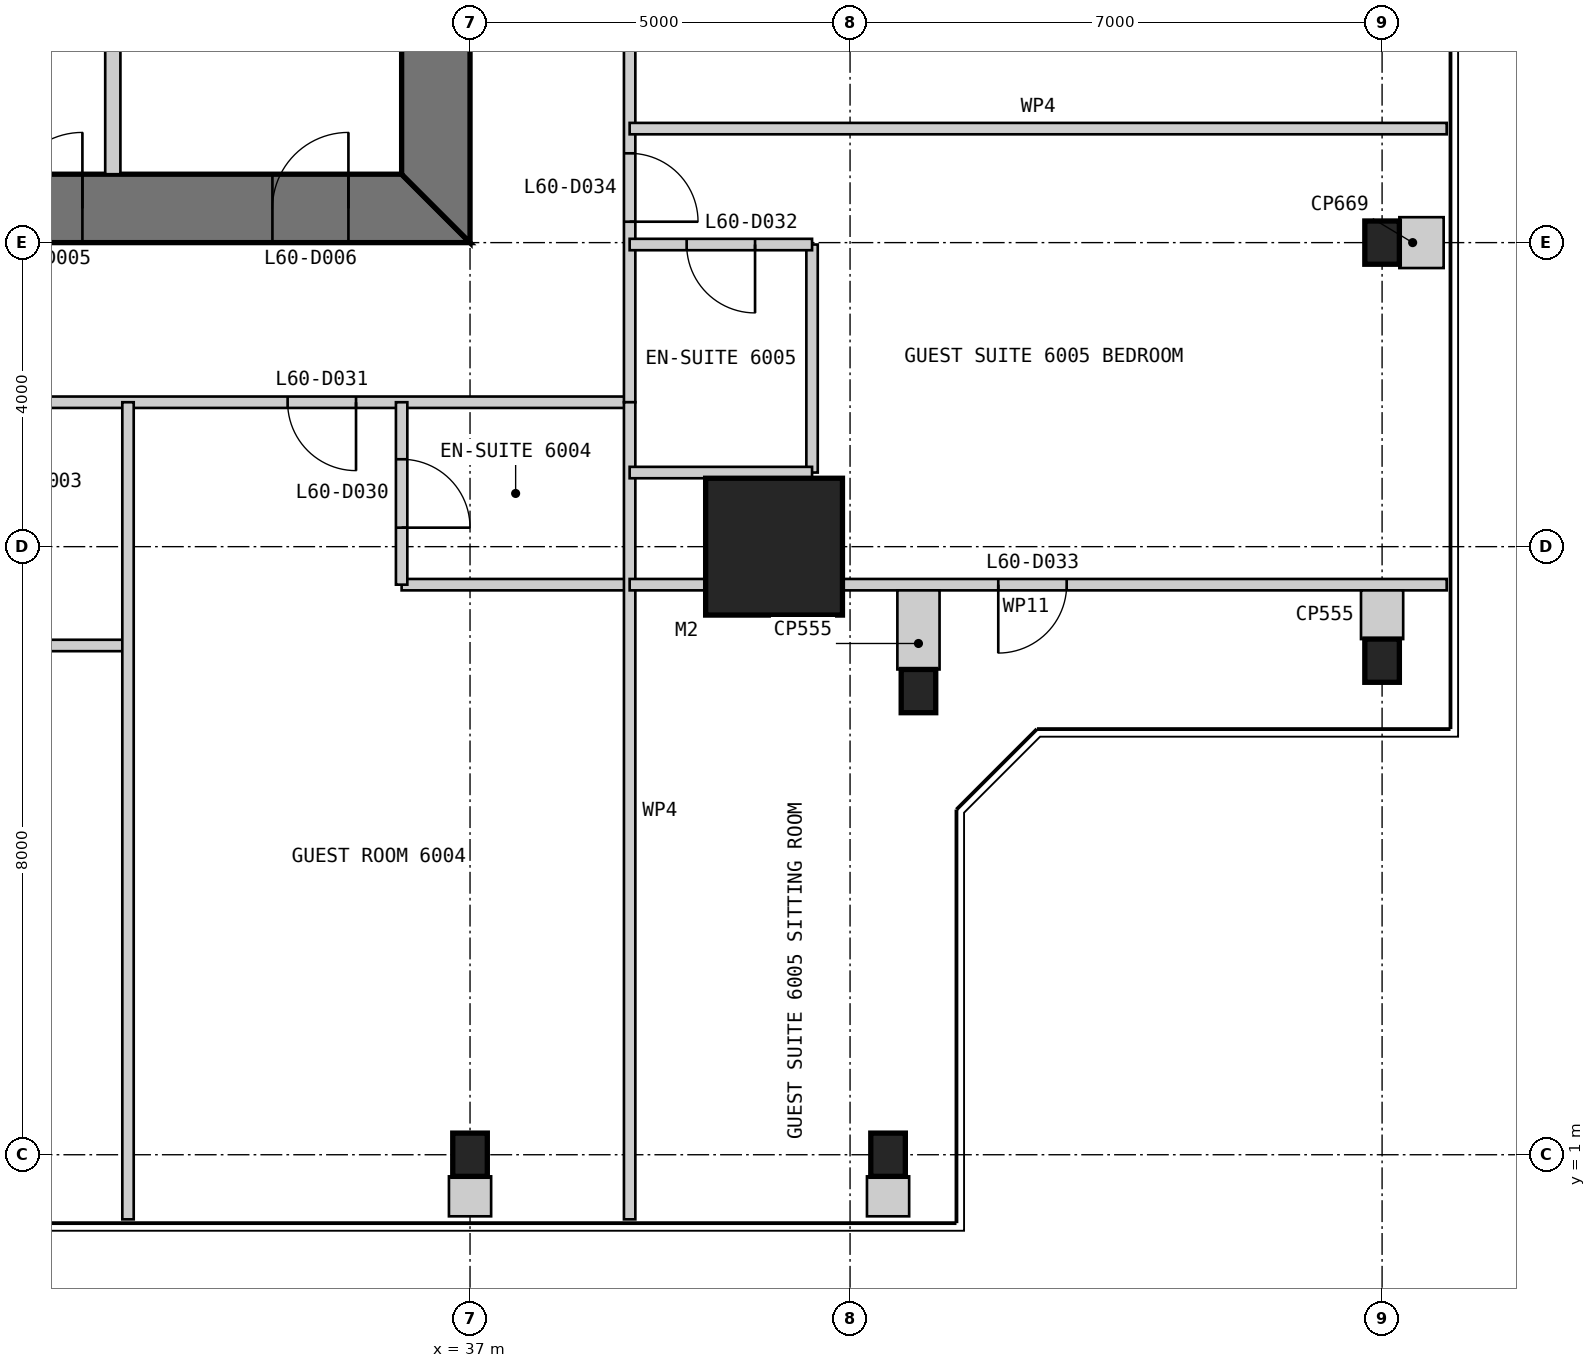
"""IFC4 building model, lengths in metres.
Left out: names, types, materials, properties, quantities, classifications, styles, units other than length and angle.
Written with IfcOpenShell. Run it as: python <this file> out.ifc"""

import sys

from ifc_helpers import new_model, si_unit, direction, frame, frame_2d, origin, origin_2d, place, context, subcontext, project, spatial, polyline, rectangle, i_section, outline, extrude, element, fill, save


model = new_model("IFC4")
c1 = context("Model", 3, precision=1e-05, world=origin(), true_north=direction((0.0, 1.0)))
c2 = subcontext(c1, "Body", "Model", "MODEL_VIEW")
j1 = project(units=[si_unit("LENGTHUNIT", "METRE"), si_unit("PLANEANGLEUNIT", "RADIAN")], contexts=[c1])
p1 = place(None, origin())
s1 = spatial("IfcSite", under=j1, at=p1, CompositionType="ELEMENT")
p2 = place(p1, origin())
s2 = spatial("IfcBuilding", under=s1, at=p2, CompositionType="ELEMENT")
p3 = place(p2, frame((0.0, 0.0, 256.0)))
s3 = spatial("IfcBuildingStorey", under=s2, at=p3, CompositionType="ELEMENT", Elevation=256.0)
p4 = place(p3, frame((41.0, 9.0, 0.0), z_axis=(0.0, 0.0, 1.0), x_axis=(1.0, 0.0, 0.0)))
e1 = element("IfcColumn", 1, at=p4, inside=s3, PredefinedType="COLUMN", context=c2, shape_type="SweptSolid", body=[
    extrude(rectangle(XDim=1.8, YDim=1.8, at=origin_2d()), origin(), (0.0, 0.0, 1.0), 3.4),
])
for number, where, z_axis, x_axis in (
    (2, (37.0, 1.0, 0.0), (0.0, 0.0, 1.0), (1.0, 0.0, 0.0)),
    (3, (42.5, 1.0, 0.0), (0.0, 0.0, 1.0), (1.0, 0.0, 0.0)),
    (4, (42.9, 7.1, 0.0), (0.0, 0.0, 1.0), (1.0, 0.0, 0.0)),
    (5, (49.0, 7.5, 0.0), (0.0, 0.0, 1.0), (1.0, 0.0, 0.0)),
    (6, (49.0, 13.0, 0.0), (0.0, 0.0, 1.0), (1.0, 0.0, 0.0)),
):
    element("IfcColumn", number, at=place(p3, frame(where, z_axis=z_axis, x_axis=x_axis)), inside=s3, PredefinedType="COLUMN", context=c2, shape_type="SweptSolid", body=[
        extrude(i_section(OverallWidth=0.455, OverallDepth=0.569, WebThickness=0.078, FlangeThickness=0.125, at=origin_2d()), origin(), (0.0, 0.0, 1.0), 3.4),
    ])
p5 = place(p3, frame((13.0, 13.45, 0.0), z_axis=(0.0, 0.0, 1.0), x_axis=(1.0, 0.0, 0.0)))
e7 = element("IfcWall", 7, at=p5, inside=s3, PredefinedType="SHEAR", context=c2, shape_type="SweptSolid", body=[
    extrude(outline(polyline([(0.0, -0.45), (24.0, -0.45), (23.1, 0.45), (0.9, 0.45), (0.0, -0.45)])), origin(), (0.0, 0.0, 1.0), 3.4),
])
p6 = place(p5, frame((4.9, 0.0, 0.0)))
e8 = element("IfcOpeningElement", 8, at=p6, cuts=e7, PredefinedType="OPENING", context=c2, shape_type="SweptSolid", body=[
    extrude(rectangle(XDim=1.0, YDim=2.2, at=frame_2d((0.5, 1.1))), frame((0.0, 0.46, 0.0), z_axis=(0.0, -1.0, 0.0), x_axis=(1.0, 0.0, 0.0)), (0.0, 0.0, 1.0), 0.92),
])
p7 = place(p5, frame((8.9, 0.0, 0.0)))
e9 = element("IfcOpeningElement", 9, at=p7, cuts=e7, PredefinedType="OPENING", context=c2, shape_type="SweptSolid", body=[
    extrude(rectangle(XDim=1.1, YDim=2.2, at=frame_2d((0.55, 1.1))), frame((0.0, 0.46, 0.0), z_axis=(0.0, -1.0, 0.0), x_axis=(1.0, 0.0, 0.0)), (0.0, 0.0, 1.0), 0.92),
])
p8 = place(p5, frame((15.05, 0.0, 0.0)))
e10 = element("IfcOpeningElement", 10, at=p8, cuts=e7, PredefinedType="OPENING", context=c2, shape_type="SweptSolid", body=[
    extrude(rectangle(XDim=0.9, YDim=2.2, at=frame_2d((0.45, 1.1))), frame((0.0, 0.46, 0.0), z_axis=(0.0, -1.0, 0.0), x_axis=(1.0, 0.0, 0.0)), (0.0, 0.0, 1.0), 0.92),
])
p9 = place(p5, frame((17.9, 0.0, 0.0)))
e11 = element("IfcOpeningElement", 11, at=p9, cuts=e7, PredefinedType="OPENING", context=c2, shape_type="SweptSolid", body=[
    extrude(rectangle(XDim=1.0, YDim=2.2, at=frame_2d((0.5, 1.1))), frame((0.0, 0.46, 0.0), z_axis=(0.0, -1.0, 0.0), x_axis=(1.0, 0.0, 0.0)), (0.0, 0.0, 1.0), 0.92),
])
p10 = place(p5, frame((21.4, 0.0, 0.0)))
e12 = element("IfcOpeningElement", 12, at=p10, cuts=e7, PredefinedType="OPENING", context=c2, shape_type="SweptSolid", body=[
    extrude(rectangle(XDim=1.0, YDim=2.2, at=frame_2d((0.5, 1.1))), frame((0.0, 0.46, 0.0), z_axis=(0.0, -1.0, 0.0), x_axis=(1.0, 0.0, 0.0)), (0.0, 0.0, 1.0), 0.92),
])
p11 = place(p3, frame((36.55, 13.9, 0.0), z_axis=(0.0, 0.0, 1.0), x_axis=(0.0, 1.0, 0.0)))
e13 = element("IfcWall", 13, at=p11, inside=s3, PredefinedType="SHEAR", context=c2, shape_type="SweptSolid", body=[
    extrude(outline(polyline([(-0.9, -0.45), (23.1, -0.45), (22.2, 0.45), (0.0, 0.45), (-0.9, -0.45)])), origin(), (0.0, 0.0, 1.0), 3.4),
])
p12 = place(p11, frame((20.2, 0.0, 0.0)))
e14 = element("IfcOpeningElement", 14, at=p12, cuts=e13, PredefinedType="OPENING", context=c2, shape_type="SweptSolid", body=[
    extrude(rectangle(XDim=1.0, YDim=2.2, at=frame_2d((0.5, 1.1))), frame((0.0, 0.46, 0.0), z_axis=(0.0, -1.0, 0.0), x_axis=(1.0, 0.0, 0.0)), (0.0, 0.0, 1.0), 0.92),
])
p13 = place(p11, frame((17.25, 0.0, 0.0)))
e15 = element("IfcOpeningElement", 15, at=p13, cuts=e13, PredefinedType="OPENING", context=c2, shape_type="SweptSolid", body=[
    extrude(rectangle(XDim=0.9, YDim=2.2, at=frame_2d((0.45, 1.1))), frame((0.0, 0.46, 0.0), z_axis=(0.0, -1.0, 0.0), x_axis=(1.0, 0.0, 0.0)), (0.0, 0.0, 1.0), 0.92),
])
p14 = place(p3, frame((32.3, 13.9, 0.0), z_axis=(0.0, 0.0, 1.0), x_axis=(0.0, 1.0, 0.0)))
e16 = element("IfcWall", 16, at=p14, inside=s3, PredefinedType="PARTITIONING", context=c2, shape_type="SweptSolid", body=[
    extrude(rectangle(XDim=6.1, YDim=0.2, at=frame_2d((3.05, 0.0))), origin(), (0.0, 0.0, 1.0), 3.2),
])
p15 = place(p3, frame((10.9, 10.9, 0.0), z_axis=(0.0, 0.0, 1.0), x_axis=(1.0, 0.0, 0.0)))
e17 = element("IfcWall", 17, at=p15, inside=s3, PredefinedType="PARTITIONING", context=c2, shape_type="SweptSolid", body=[
    extrude(rectangle(XDim=28.2, YDim=0.15, at=frame_2d((14.1, 0.0))), origin(), (0.0, 0.0, 1.0), 3.25),
])
p16 = place(p15, frame((2.375, 0.0, 0.0)))
e18 = element("IfcOpeningElement", 18, at=p16, cuts=e17, PredefinedType="OPENING", context=c2, shape_type="SweptSolid", body=[
    extrude(rectangle(XDim=0.9, YDim=2.1, at=frame_2d((0.45, 1.05))), frame((0.0, 0.085, 0.0), z_axis=(0.0, -1.0, 0.0), x_axis=(1.0, 0.0, 0.0)), (0.0, 0.0, 1.0), 0.17),
])
p17 = place(p15, frame((10.7, 0.0, 0.0)))
e19 = element("IfcOpeningElement", 19, at=p17, cuts=e17, PredefinedType="OPENING", context=c2, shape_type="SweptSolid", body=[
    extrude(rectangle(XDim=0.9, YDim=2.1, at=frame_2d((0.45, 1.05))), frame((0.0, 0.085, 0.0), z_axis=(0.0, -1.0, 0.0), x_axis=(1.0, 0.0, 0.0)), (0.0, 0.0, 1.0), 0.17),
])
p18 = place(p15, frame((16.8, 0.0, 0.0)))
e20 = element("IfcOpeningElement", 20, at=p18, cuts=e17, PredefinedType="OPENING", context=c2, shape_type="SweptSolid", body=[
    extrude(rectangle(XDim=1.0, YDim=2.1, at=frame_2d((0.5, 1.05))), frame((0.0, 0.085, 0.0), z_axis=(0.0, -1.0, 0.0), x_axis=(1.0, 0.0, 0.0)), (0.0, 0.0, 1.0), 0.17),
])
p19 = place(p15, frame((23.7, 0.0, 0.0)))
e21 = element("IfcOpeningElement", 21, at=p19, cuts=e17, PredefinedType="OPENING", context=c2, shape_type="SweptSolid", body=[
    extrude(rectangle(XDim=0.9, YDim=2.1, at=frame_2d((0.45, 1.05))), frame((0.0, 0.085, 0.0), z_axis=(0.0, -1.0, 0.0), x_axis=(1.0, 0.0, 0.0)), (0.0, 0.0, 1.0), 0.17),
])
p20 = place(p3, frame((29.3, 7.7, 0.0), z_axis=(0.0, 0.0, 1.0), x_axis=(1.0, 0.0, 0.0)))
e22 = element("IfcWall", 22, at=p20, inside=s3, PredefinedType="PARTITIONING", context=c2, shape_type="SweptSolid", body=[
    extrude(rectangle(XDim=3.2, YDim=0.15, at=frame_2d((1.6, 0.0))), origin(), (0.0, 0.0, 1.0), 3.25),
])
p21 = place(p3, frame((32.5, 0.15, 0.0), z_axis=(0.0, 0.0, 1.0), x_axis=(0.0, 1.0, 0.0)))
e23 = element("IfcWall", 23, at=p21, inside=s3, PredefinedType="PARTITIONING", context=c2, shape_type="SweptSolid", body=[
    extrude(rectangle(XDim=10.75, YDim=0.15, at=frame_2d((5.375, 0.0))), origin(), (0.0, 0.0, 1.0), 3.25),
])
p22 = place(p3, frame((36.1, 8.5, 0.0), z_axis=(0.0, 0.0, 1.0), x_axis=(1.0, 0.0, 0.0)))
e24 = element("IfcWall", 24, at=p22, inside=s3, PredefinedType="PARTITIONING", context=c2, shape_type="SweptSolid", body=[
    extrude(rectangle(XDim=3.0, YDim=0.15, at=frame_2d((1.5, 0.0))), origin(), (0.0, 0.0, 1.0), 3.25),
])
p23 = place(p3, frame((36.1, 8.5, 0.0), z_axis=(0.0, 0.0, 1.0), x_axis=(0.0, 1.0, 0.0)))
e25 = element("IfcWall", 25, at=p23, inside=s3, PredefinedType="PARTITIONING", context=c2, shape_type="SweptSolid", body=[
    extrude(rectangle(XDim=2.4, YDim=0.15, at=frame_2d((1.2, 0.0))), origin(), (0.0, 0.0, 1.0), 3.25),
])
p24 = place(p23, frame((0.75, 0.0, 0.0)))
e26 = element("IfcOpeningElement", 26, at=p24, cuts=e25, PredefinedType="OPENING", context=c2, shape_type="SweptSolid", body=[
    extrude(rectangle(XDim=0.9, YDim=2.1, at=frame_2d((0.45, 1.05))), frame((0.0, 0.085, 0.0), z_axis=(0.0, -1.0, 0.0), x_axis=(1.0, 0.0, 0.0)), (0.0, 0.0, 1.0), 0.17),
])
p25 = place(p3, frame((39.1, 10.9, 0.0), z_axis=(0.0, 0.0, 1.0), x_axis=(0.0, 1.0, 0.0)))
e27 = element("IfcWall", 27, at=p25, inside=s3, PredefinedType="PARTITIONING", context=c2, shape_type="SweptSolid", body=[
    extrude(rectangle(XDim=28.2, YDim=0.15, at=frame_2d((14.1, 0.0))), origin(), (0.0, 0.0, 1.0), 3.25),
])
p26 = place(p25, frame((2.375, 0.0, 0.0)))
e28 = element("IfcOpeningElement", 28, at=p26, cuts=e27, PredefinedType="OPENING", context=c2, shape_type="SweptSolid", body=[
    extrude(rectangle(XDim=0.9, YDim=2.1, at=frame_2d((0.45, 1.05))), frame((0.0, 0.085, 0.0), z_axis=(0.0, -1.0, 0.0), x_axis=(1.0, 0.0, 0.0)), (0.0, 0.0, 1.0), 0.17),
])
p27 = place(p25, frame((10.7, 0.0, 0.0)))
e29 = element("IfcOpeningElement", 29, at=p27, cuts=e27, PredefinedType="OPENING", context=c2, shape_type="SweptSolid", body=[
    extrude(rectangle(XDim=0.9, YDim=2.1, at=frame_2d((0.45, 1.05))), frame((0.0, 0.085, 0.0), z_axis=(0.0, -1.0, 0.0), x_axis=(1.0, 0.0, 0.0)), (0.0, 0.0, 1.0), 0.17),
])
p28 = place(p25, frame((17.1, 0.0, 0.0)))
e30 = element("IfcOpeningElement", 30, at=p28, cuts=e27, PredefinedType="OPENING", context=c2, shape_type="SweptSolid", body=[
    extrude(rectangle(XDim=0.9, YDim=2.1, at=frame_2d((0.45, 1.05))), frame((0.0, 0.085, 0.0), z_axis=(0.0, -1.0, 0.0), x_axis=(1.0, 0.0, 0.0)), (0.0, 0.0, 1.0), 0.17),
])
p29 = place(p25, frame((23.7, 0.0, 0.0)))
e31 = element("IfcOpeningElement", 31, at=p29, cuts=e27, PredefinedType="OPENING", context=c2, shape_type="SweptSolid", body=[
    extrude(rectangle(XDim=0.9, YDim=2.1, at=frame_2d((0.45, 1.05))), frame((0.0, 0.085, 0.0), z_axis=(0.0, -1.0, 0.0), x_axis=(1.0, 0.0, 0.0)), (0.0, 0.0, 1.0), 0.17),
])
p30 = place(p3, frame((39.1, 0.15, 0.0), z_axis=(0.0, 0.0, 1.0), x_axis=(0.0, 1.0, 0.0)))
e32 = element("IfcWall", 32, at=p30, inside=s3, PredefinedType="PARTITIONING", context=c2, shape_type="SweptSolid", body=[
    extrude(rectangle(XDim=10.75, YDim=0.15, at=frame_2d((5.375, 0.0))), origin(), (0.0, 0.0, 1.0), 3.25),
])
p31 = place(p3, frame((41.5, 9.975, 0.0), z_axis=(0.0, 0.0, 1.0), x_axis=(0.0, 1.0, 0.0)))
e33 = element("IfcWall", 33, at=p31, inside=s3, PredefinedType="PARTITIONING", context=c2, shape_type="SweptSolid", body=[
    extrude(rectangle(XDim=3.0, YDim=0.15, at=frame_2d((1.5, 0.0))), origin(), (0.0, 0.0, 1.0), 3.25),
])
p32 = place(p3, frame((41.5, 12.975, 0.0), z_axis=(0.0, 0.0, 1.0), x_axis=(-1.0, 0.0, 0.0)))
e34 = element("IfcWall", 34, at=p32, inside=s3, PredefinedType="PARTITIONING", context=c2, shape_type="SweptSolid", body=[
    extrude(rectangle(XDim=2.4, YDim=0.15, at=frame_2d((1.2, 0.0))), origin(), (0.0, 0.0, 1.0), 2.404),
])
p33 = place(p32, frame((0.75, 0.0, 0.0)))
e35 = element("IfcOpeningElement", 35, at=p33, cuts=e34, PredefinedType="OPENING", context=c2, shape_type="SweptSolid", body=[
    extrude(rectangle(XDim=0.9, YDim=2.1, at=frame_2d((0.45, 1.05))), frame((0.0, 0.085, 0.0), z_axis=(0.0, -1.0, 0.0), x_axis=(1.0, 0.0, 0.0)), (0.0, 0.0, 1.0), 0.17),
])
p34 = place(p3, frame((41.5, 9.975, 0.0), z_axis=(0.0, 0.0, 1.0), x_axis=(-1.0, 0.0, 0.0)))
e36 = element("IfcWall", 36, at=p34, inside=s3, PredefinedType="PARTITIONING", context=c2, shape_type="SweptSolid", body=[
    extrude(rectangle(XDim=2.4, YDim=0.15, at=frame_2d((1.2, 0.0))), origin(), (0.0, 0.0, 1.0), 3.25),
])
p35 = place(p3, frame((49.85, 8.5, 0.0), z_axis=(0.0, 0.0, 1.0), x_axis=(-1.0, 0.0, 0.0)))
e37 = element("IfcWall", 37, at=p35, inside=s3, PredefinedType="PARTITIONING", context=c2, shape_type="SweptSolid", body=[
    extrude(rectangle(XDim=10.75, YDim=0.15, at=frame_2d((5.375, 0.0))), origin(), (0.0, 0.0, 1.0), 3.25),
])
p36 = place(p35, frame((5.0, 0.0, 0.0)))
e38 = element("IfcOpeningElement", 38, at=p36, cuts=e37, PredefinedType="OPENING", context=c2, shape_type="SweptSolid", body=[
    extrude(rectangle(XDim=0.9, YDim=2.1, at=frame_2d((0.45, 1.05))), frame((0.0, 0.085, 0.0), z_axis=(0.0, -1.0, 0.0), x_axis=(1.0, 0.0, 0.0)), (0.0, 0.0, 1.0), 0.17),
])
p37 = place(p3, frame((49.85, 14.5, 0.0), z_axis=(0.0, 0.0, 1.0), x_axis=(-1.0, 0.0, 0.0)))
e39 = element("IfcWall", 39, at=p37, inside=s3, PredefinedType="PARTITIONING", context=c2, shape_type="SweptSolid", body=[
    extrude(rectangle(XDim=10.75, YDim=0.15, at=frame_2d((5.375, 0.0))), origin(), (0.0, 0.0, 1.0), 3.25),
])
for number, where, z_axis, x_axis in (
    (40, (37.0, 0.19, 0.0), (0.0, 0.0, 1.0), (0.0, 1.0, 0.0)),
    (41, (42.5, 0.19, 0.0), (0.0, 0.0, 1.0), (0.0, 1.0, 0.0)),
):
    element("IfcWall", number, at=place(p3, frame(where, z_axis=z_axis, x_axis=x_axis)), inside=s3, PredefinedType="PARTITIONING", context=c2, shape_type="SweptSolid", body=[
        extrude(rectangle(XDim=0.526, YDim=0.555, at=frame_2d((0.263, 0.0))), origin(), (0.0, 0.0, 1.0), 3.25),
    ])
p38 = place(p3, frame((42.9, 8.425, 0.0), z_axis=(0.0, 0.0, 1.0), x_axis=(0.0, -1.0, 0.0)))
e42 = element("IfcWall", 42, at=p38, inside=s3, PredefinedType="PARTITIONING", context=c2, shape_type="SweptSolid", body=[
    extrude(rectangle(XDim=1.041, YDim=0.555, at=frame_2d((0.52, 0.0))), origin(), (0.0, 0.0, 1.0), 3.25),
])
p39 = place(p3, frame((49.0, 8.425, 0.0), z_axis=(0.0, 0.0, 1.0), x_axis=(0.0, -1.0, 0.0)))
e43 = element("IfcWall", 43, at=p39, inside=s3, PredefinedType="PARTITIONING", context=c2, shape_type="SweptSolid", body=[
    extrude(rectangle(XDim=0.641, YDim=0.555, at=frame_2d((0.32, 0.0))), origin(), (0.0, 0.0, 1.0), 2.338),
])
p40 = place(p3, frame((49.81, 13.0, 0.0), z_axis=(0.0, 0.0, 1.0), x_axis=(-1.0, 0.0, 0.0)))
e44 = element("IfcWall", 44, at=p40, inside=s3, PredefinedType="PARTITIONING", context=c2, shape_type="SweptSolid", body=[
    extrude(rectangle(XDim=0.583, YDim=0.669, at=frame_2d((0.292, 0.0))), origin(), (0.0, 0.0, 1.0), 3.25),
])
p41 = place(p9, origin())
e45 = element("IfcDoor", 45, at=p41, inside=s3, OperationType="SINGLE_SWING_RIGHT", PredefinedType="DOOR", context=c2, shape_type="SweptSolid", body=[
    extrude(rectangle(XDim=1.0, YDim=2.2, at=frame_2d((0.5, 1.1))), frame((0.0, 0.025, 0.0), z_axis=(0.0, -1.0, 0.0), x_axis=(1.0, 0.0, 0.0)), (0.0, 0.0, 1.0), 0.05),
    extrude(outline(polyline([(0.0, 0.0), (0.04, 0.0), (0.04, 2.16), (0.96, 2.16), (0.96, 0.0), (1.0, 0.0), (1.0, 2.2), (0.0, 2.2), (0.0, 0.0)])), frame((0.0, 0.3, 0.0), z_axis=(0.0, -1.0, 0.0), x_axis=(1.0, 0.0, 0.0)), (0.0, 0.0, 1.0), 0.6),
])
fill(e11, e45)
p42 = place(p10, origin())
e46 = element("IfcDoor", 46, at=p42, inside=s3, OperationType="SINGLE_SWING_RIGHT", PredefinedType="DOOR", context=c2, shape_type="SweptSolid", body=[
    extrude(rectangle(XDim=1.0, YDim=2.2, at=frame_2d((0.5, 1.1))), frame((0.0, 0.025, 0.0), z_axis=(0.0, -1.0, 0.0), x_axis=(1.0, 0.0, 0.0)), (0.0, 0.0, 1.0), 0.05),
    extrude(outline(polyline([(0.0, 0.0), (0.04, 0.0), (0.04, 2.16), (0.96, 2.16), (0.96, 0.0), (1.0, 0.0), (1.0, 2.2), (0.0, 2.2), (0.0, 0.0)])), frame((0.0, 0.3, 0.0), z_axis=(0.0, -1.0, 0.0), x_axis=(1.0, 0.0, 0.0)), (0.0, 0.0, 1.0), 0.6),
])
fill(e12, e46)
p43 = place(p24, frame((0.9, 0.0, 0.0), z_axis=(0.0, 0.0, 1.0), x_axis=(-1.0, 0.0, 0.0)))
e47 = element("IfcDoor", 47, at=p43, inside=s3, OperationType="SINGLE_SWING_RIGHT", PredefinedType="DOOR", context=c2, shape_type="SweptSolid", body=[
    extrude(rectangle(XDim=0.9, YDim=2.1, at=frame_2d((0.45, 1.05))), frame((0.0, 0.025, 0.0), z_axis=(0.0, -1.0, 0.0), x_axis=(1.0, 0.0, 0.0)), (0.0, 0.0, 1.0), 0.05),
])
fill(e26, e47)
p44 = place(p19, frame((0.9, 0.0, 0.0), z_axis=(0.0, 0.0, 1.0), x_axis=(-1.0, 0.0, 0.0)))
e48 = element("IfcDoor", 48, at=p44, inside=s3, OperationType="SINGLE_SWING_LEFT", PredefinedType="DOOR", context=c2, shape_type="SweptSolid", body=[
    extrude(rectangle(XDim=0.9, YDim=2.1, at=frame_2d((0.45, 1.05))), frame((0.0, 0.025, 0.0), z_axis=(0.0, -1.0, 0.0), x_axis=(1.0, 0.0, 0.0)), (0.0, 0.0, 1.0), 0.05),
])
fill(e21, e48)
p45 = place(p33, origin())
e49 = element("IfcDoor", 49, at=p45, inside=s3, OperationType="SINGLE_SWING_LEFT", PredefinedType="DOOR", context=c2, shape_type="SweptSolid", body=[
    extrude(rectangle(XDim=0.9, YDim=2.1, at=frame_2d((0.45, 1.05))), frame((0.0, 0.025, 0.0), z_axis=(0.0, -1.0, 0.0), x_axis=(1.0, 0.0, 0.0)), (0.0, 0.0, 1.0), 0.05),
])
fill(e35, e49)
p46 = place(p36, origin())
e50 = element("IfcDoor", 50, at=p46, inside=s3, OperationType="SINGLE_SWING_RIGHT", PredefinedType="DOOR", context=c2, shape_type="SweptSolid", body=[
    extrude(rectangle(XDim=0.9, YDim=2.1, at=frame_2d((0.45, 1.05))), frame((0.0, 0.025, 0.0), z_axis=(0.0, -1.0, 0.0), x_axis=(1.0, 0.0, 0.0)), (0.0, 0.0, 1.0), 0.05),
])
fill(e38, e50)
p47 = place(p26, frame((0.9, 0.0, 0.0), z_axis=(0.0, 0.0, 1.0), x_axis=(-1.0, 0.0, 0.0)))
e51 = element("IfcDoor", 51, at=p47, inside=s3, OperationType="SINGLE_SWING_RIGHT", PredefinedType="DOOR", context=c2, shape_type="SweptSolid", body=[
    extrude(rectangle(XDim=0.9, YDim=2.1, at=frame_2d((0.45, 1.05))), frame((0.0, 0.025, 0.0), z_axis=(0.0, -1.0, 0.0), x_axis=(1.0, 0.0, 0.0)), (0.0, 0.0, 1.0), 0.05),
])
fill(e28, e51)
save(model, sys.argv[1])
